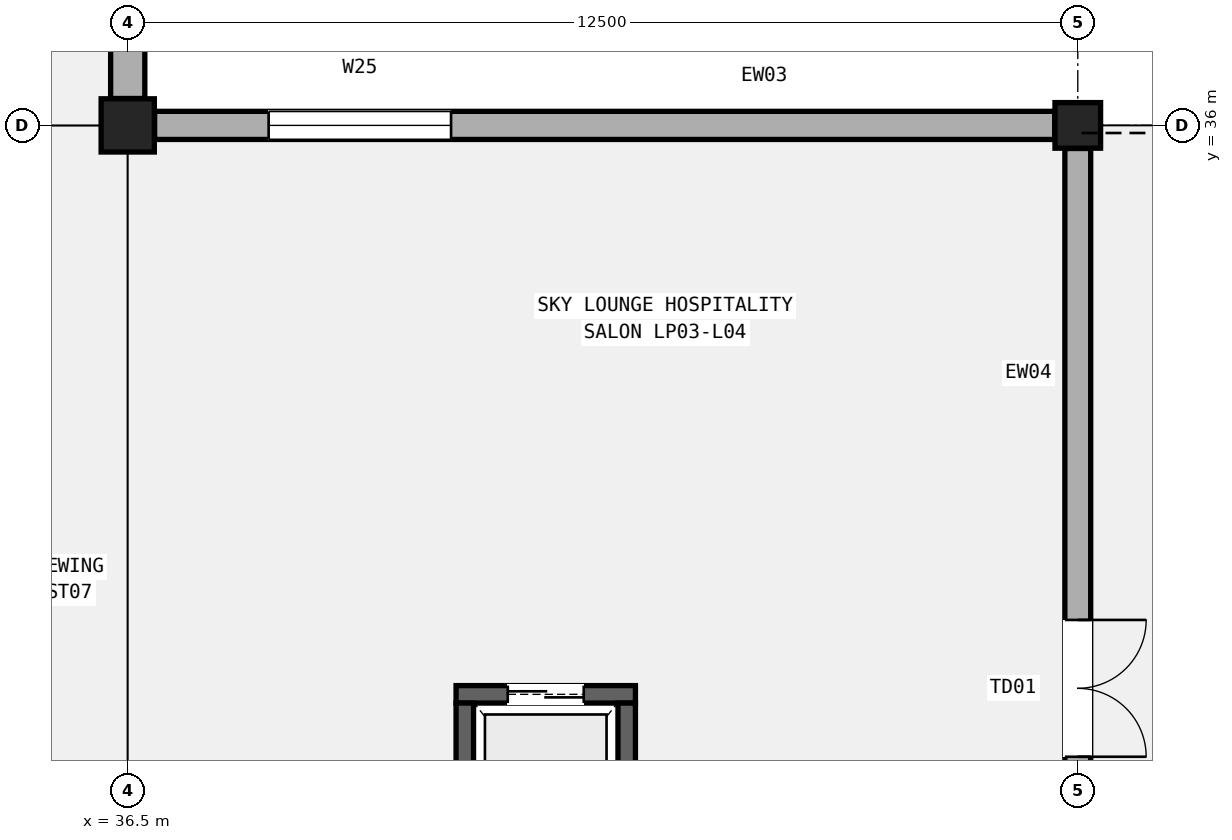
"""IFC4 building model, lengths in metres.
Left out: names, types, materials, properties, quantities, classifications, styles, units other than length and angle.
Written with IfcOpenShell. Run it as: python <this file> out.ifc"""

import sys

from ifc_helpers import new_model, si_unit, direction, frame, frame_2d, origin, origin_2d, place, context, subcontext, project, spatial, rectangle, extrude, element, fill, save


model = new_model("IFC4")
c1 = context("Model", 3, precision=1e-05, world=origin(), true_north=direction((0.0, 1.0)))
c2 = subcontext(c1, "Body", "Model", "MODEL_VIEW")
j1 = project(units=[si_unit("LENGTHUNIT", "METRE"), si_unit("PLANEANGLEUNIT", "RADIAN")], contexts=[c1])
p1 = place(None, origin())
s1 = spatial("IfcSite", under=j1, at=p1, CompositionType="ELEMENT")
p2 = place(p1, origin())
s2 = spatial("IfcBuilding", under=s1, at=p2, CompositionType="ELEMENT")
p3 = place(p2, frame((0.0, 0.0, 20.4)))
s3 = spatial("IfcBuildingStorey", under=s2, at=p3, CompositionType="ELEMENT", Elevation=20.4)
p4 = place(p3, frame((36.5, 36.0, 0.0), z_axis=(0.0, 0.0, 1.0), x_axis=(1.0, 0.0, 0.0)))
e1 = element("IfcColumn", 1, at=p4, inside=s3, PredefinedType="COLUMN", context=c2, shape_type="SweptSolid", body=[
    extrude(rectangle(XDim=0.7, YDim=0.7, at=origin_2d()), origin(), (0.0, 0.0, 1.0), 5.4),
])
p5 = place(p3, frame((49.0, 36.0, 0.0), z_axis=(0.0, 0.0, 1.0), x_axis=(1.0, 0.0, 0.0)))
e2 = element("IfcColumn", 2, at=p5, inside=s3, PredefinedType="COLUMN", context=c2, shape_type="SweptSolid", body=[
    extrude(rectangle(XDim=0.6, YDim=0.6, at=origin_2d()), origin(), (0.0, 0.0, 1.0), 5.4),
])
p6 = place(p3, frame((36.5, 36.354, 0.0), z_axis=(0.0, 0.0, 1.0), x_axis=(0.0, 1.0, 0.0)))
e3 = element("IfcWall", 3, at=p6, inside=s3, PredefinedType="SOLIDWALL", context=c2, shape_type="SweptSolid", body=[
    extrude(rectangle(XDim=11.342, YDim=0.45, at=frame_2d((5.671, 0.0))), origin(), (0.0, 0.0, 1.0), 4.48),
])
p7 = place(p6, frame((1.5, 0.0, 0.95)))
e4 = element("IfcOpeningElement", 4, at=p7, cuts=e3, PredefinedType="OPENING", context=c2, shape_type="SweptSolid", body=[
    extrude(rectangle(XDim=1.8, YDim=2.55, at=frame_2d((0.9, 1.275))), frame((0.0, 0.235, 0.0), z_axis=(0.0, -1.0, 0.0), x_axis=(1.0, 0.0, 0.0)), (0.0, 0.0, 1.0), 0.47),
])
p8 = place(p3, frame((36.854, 36.0, 0.0), z_axis=(0.0, 0.0, 1.0), x_axis=(1.0, 0.0, 0.0)))
e5 = element("IfcWall", 5, at=p8, inside=s3, PredefinedType="SOLIDWALL", context=c2, shape_type="SweptSolid", body=[
    extrude(rectangle(XDim=11.842, YDim=0.37, at=frame_2d((5.921, 0.0))), origin(), (0.0, 0.0, 1.0), 4.48),
])
p9 = place(p8, frame((1.5, 0.0, 0.95)))
e6 = element("IfcOpeningElement", 6, at=p9, cuts=e5, PredefinedType="OPENING", context=c2, shape_type="SweptSolid", body=[
    extrude(rectangle(XDim=2.4, YDim=2.45, at=frame_2d((1.2, 1.225))), frame((0.0, 0.195, 0.0), z_axis=(0.0, -1.0, 0.0), x_axis=(1.0, 0.0, 0.0)), (0.0, 0.0, 1.0), 0.39),
])
p10 = place(p3, frame((49.0, 24.354, 0.0), z_axis=(0.0, 0.0, 1.0), x_axis=(0.0, 1.0, 0.0)))
e7 = element("IfcWall", 7, at=p10, inside=s3, PredefinedType="SOLIDWALL", context=c2, shape_type="SweptSolid", body=[
    extrude(rectangle(XDim=11.342, YDim=0.34, at=frame_2d((5.671, 0.0))), origin(), (0.0, 0.0, 1.0), 4.48),
])
p11 = place(p10, frame((5.14, 0.0, 0.0), z_axis=(0.0, 0.0, 1.0), x_axis=(-1.0, 0.0, 0.0)))
e8 = element("IfcOpeningElement", 8, at=p11, cuts=e7, PredefinedType="OPENING", context=c2, shape_type="SweptSolid", body=[
    extrude(rectangle(XDim=1.8, YDim=2.3, at=frame_2d((0.9, 1.15))), frame((0.0, 0.18, 0.0), z_axis=(0.0, -1.0, 0.0), x_axis=(1.0, 0.0, 0.0)), (0.0, 0.0, 1.0), 0.36),
])
p12 = place(p3, frame((40.82, 28.515, 0.0), z_axis=(0.0, 0.0, 1.0), x_axis=(1.0, 0.0, 0.0)))
e9 = element("IfcWall", 9, at=p12, inside=s3, PredefinedType="SHEAR", context=c2, shape_type="SweptSolid", body=[
    extrude(rectangle(XDim=2.36, YDim=0.23, at=frame_2d((1.18, 0.0))), origin(), (0.0, 0.0, 1.0), 5.18),
])
p13 = place(p12, frame((0.68, 0.0, 0.0)))
e10 = element("IfcOpeningElement", 10, at=p13, cuts=e9, PredefinedType="OPENING", context=c2, shape_type="SweptSolid", body=[
    extrude(rectangle(XDim=1.0, YDim=2.15, at=frame_2d((0.5, 1.075))), frame((0.0, 0.125, 0.0), z_axis=(0.0, -1.0, 0.0), x_axis=(1.0, 0.0, 0.0)), (0.0, 0.0, 1.0), 0.25),
])
for number, where, z_axis, x_axis in (
    (11, (40.935, 26.0, 0.0), (0.0, 0.0, 1.0), (0.0, 1.0, 0.0)),
    (12, (43.065, 26.0, 0.0), (0.0, 0.0, 1.0), (0.0, 1.0, 0.0)),
):
    element("IfcWall", number, at=place(p3, frame(where, z_axis=z_axis, x_axis=x_axis)), inside=s3, PredefinedType="SHEAR", context=c2, shape_type="SweptSolid", body=[
        extrude(rectangle(XDim=2.4, YDim=0.23, at=frame_2d((1.2, 0.0))), origin(), (0.0, 0.0, 1.0), 5.18),
    ])
p14 = place(p9, origin())
e13 = element("IfcWindow", 13, at=p14, inside=s3, PartitioningType="SINGLE_PANEL", PredefinedType="WINDOW", context=c2, shape_type="SweptSolid", body=[
    extrude(rectangle(XDim=2.4, YDim=2.45, at=frame_2d((1.2, 1.225))), frame((0.0, 0.03, 0.0), z_axis=(0.0, -1.0, 0.0), x_axis=(1.0, 0.0, 0.0)), (0.0, 0.0, 1.0), 0.06),
])
fill(e6, e13)
p15 = place(p11, origin())
e14 = element("IfcDoor", 14, at=p15, inside=s3, OperationType="DOUBLE_DOOR_SINGLE_SWING", PredefinedType="DOOR", context=c2, shape_type="SweptSolid", body=[
    extrude(rectangle(XDim=1.8, YDim=2.3, at=frame_2d((0.9, 1.15))), frame((0.0, 0.025, 0.0), z_axis=(0.0, -1.0, 0.0), x_axis=(1.0, 0.0, 0.0)), (0.0, 0.0, 1.0), 0.05),
])
fill(e8, e14)
p16 = place(p13, origin())
e15 = element("IfcDoor", 15, at=p16, inside=s3, OperationType="DOUBLE_DOOR_SLIDING", PredefinedType="DOOR", context=c2, shape_type="SweptSolid", body=[
    extrude(rectangle(XDim=1.0, YDim=2.15, at=frame_2d((0.5, 1.075))), frame((0.0, 0.025, 0.0), z_axis=(0.0, -1.0, 0.0), x_axis=(1.0, 0.0, 0.0)), (0.0, 0.0, 1.0), 0.05),
])
fill(e10, e15)
save(model, sys.argv[1])
